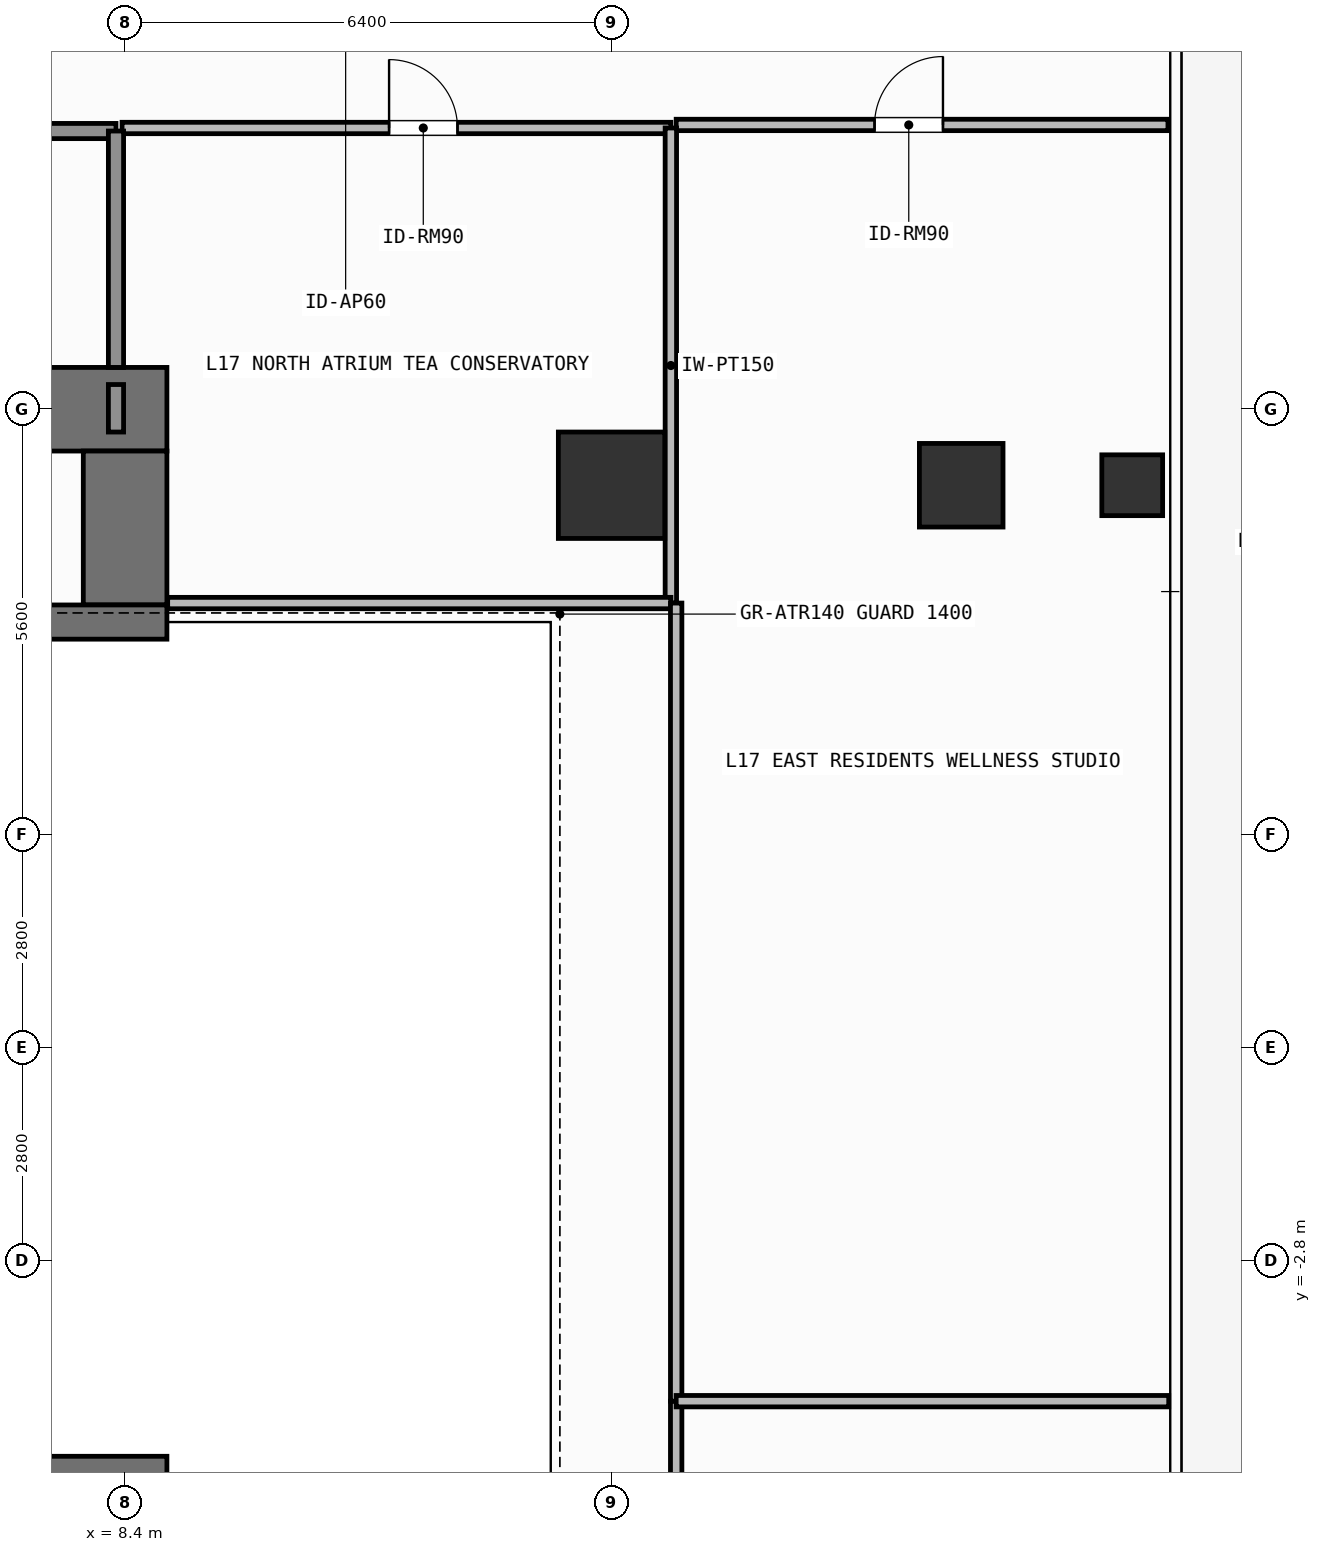
"""IFC4 building model, lengths in metres.
Left out: names, types, materials, properties, quantities, classifications, styles, units other than length and angle.
Written with IfcOpenShell. Run it as: python <this file> out.ifc"""

import sys

from ifc_helpers import new_model, si_unit, direction, frame, frame_2d, origin, origin_2d, place, context, subcontext, project, spatial, rectangle, hollow_rectangle, extrude, element, fill, save


model = new_model("IFC4")
c1 = context("Model", 3, precision=1e-05, world=origin(), true_north=direction((0.0, 1.0)))
c2 = subcontext(c1, "Body", "Model", "MODEL_VIEW")
j1 = project(units=[si_unit("LENGTHUNIT", "METRE"), si_unit("PLANEANGLEUNIT", "RADIAN")], contexts=[c1])
p1 = place(None, origin())
s1 = spatial("IfcSite", under=j1, at=p1, CompositionType="ELEMENT")
p2 = place(p1, origin())
s2 = spatial("IfcBuilding", under=s1, at=p2, CompositionType="ELEMENT")
p3 = place(p2, frame((0.0, 0.0, 65.7)))
s3 = spatial("IfcBuildingStorey", under=s2, at=p3, CompositionType="ELEMENT", Elevation=65.7)
p4 = place(p3, frame((-7.55, 8.4, 0.0), z_axis=(0.0, 0.0, 1.0), x_axis=(1.0, 0.0, 0.0)))
e1 = element("IfcWall", 1, at=p4, inside=s3, PredefinedType="SHEAR", context=c2, shape_type="SweptSolid", body=[
    extrude(rectangle(XDim=16.5, YDim=1.1, at=frame_2d((8.25, 0.0))), origin(), (0.0, 0.0, 1.0), 3.9),
])
p5 = place(p3, frame((8.4, 5.825, 0.0), z_axis=(0.0, 0.0, 1.0), x_axis=(0.0, 1.0, 0.0)))
e2 = element("IfcWall", 2, at=p5, inside=s3, PredefinedType="SHEAR", context=c2, shape_type="SweptSolid", body=[
    extrude(rectangle(XDim=2.025, YDim=1.1, at=frame_2d((1.013, 0.0))), origin(), (0.0, 0.0, 1.0), 3.9),
])
for number, where, z_axis, x_axis in (
    (3, (3.045, -5.6, 0.0), (0.0, 0.0, 1.0), (1.0, 0.0, 0.0)),
    (4, (3.045, 5.6, 0.0), (0.0, 0.0, 1.0), (1.0, 0.0, 0.0)),
):
    element("IfcWall", number, at=place(p3, frame(where, z_axis=z_axis, x_axis=x_axis)), inside=s3, PredefinedType="SHEAR", context=c2, shape_type="SweptSolid", body=[
        extrude(rectangle(XDim=5.905, YDim=0.45, at=frame_2d((2.953, 0.0))), origin(), (0.0, 0.0, 1.0), 3.9),
    ])
p6 = place(p3, frame((14.8, 7.4, 0.0), z_axis=(0.0, 0.0, 1.0), x_axis=(1.0, 0.0, 0.0)))
e5 = element("IfcColumn", 5, at=p6, inside=s3, PredefinedType="COLUMN", context=c2, shape_type="SweptSolid", body=[
    extrude(rectangle(XDim=1.4, YDim=1.4, at=origin_2d()), origin(), (0.0, 0.0, 1.0), 3.9),
])
p7 = place(p3, frame((19.4, 7.4, 0.0), z_axis=(0.0, 0.0, 1.0), x_axis=(1.0, 0.0, 0.0)))
e6 = element("IfcColumn", 6, at=p7, inside=s3, PredefinedType="COLUMN", context=c2, shape_type="SweptSolid", body=[
    extrude(rectangle(XDim=1.1, YDim=1.1, at=origin_2d()), origin(), (0.0, 0.0, 1.0), 3.9),
])
p8 = place(p3, frame((21.65, 7.4, 0.0), z_axis=(0.0, 0.0, 1.0), x_axis=(1.0, 0.0, 0.0)))
e7 = element("IfcColumn", 7, at=p8, inside=s3, PredefinedType="COLUMN", context=c2, shape_type="SweptSolid", body=[
    extrude(hollow_rectangle(XDim=0.8, YDim=0.8, WallThickness=0.036, at=origin_2d()), origin(), (0.0, 0.0, 1.0), 3.9),
])
p9 = place(p3, frame((4.58, 12.06, 0.0), z_axis=(0.0, 0.0, 1.0), x_axis=(1.0, 0.0, 0.0)))
e8 = element("IfcWall", 8, at=p9, inside=s3, PredefinedType="SOLIDWALL", context=c2, shape_type="SweptSolid", body=[
    extrude(rectangle(XDim=3.7, YDim=0.2, at=frame_2d((1.85, 0.0))), origin(), (0.0, 0.0, 1.0), 3.68),
])
p10 = place(p9, frame((1.212, 0.0, 0.0)))
e9 = element("IfcOpeningElement", 9, at=p10, cuts=e8, PredefinedType="OPENING", context=c2, shape_type="SweptSolid", body=[
    extrude(rectangle(XDim=1.1, YDim=2.15, at=frame_2d((0.55, 1.075))), frame((0.0, 0.11, 0.0), z_axis=(0.0, -1.0, 0.0), x_axis=(1.0, 0.0, 0.0)), (0.0, 0.0, 1.0), 0.22),
])
p11 = place(p3, frame((8.36, 12.1, 0.0), z_axis=(0.0, 0.0, 1.0), x_axis=(1.0, 0.0, 0.0)))
e10 = element("IfcWall", 10, at=p11, inside=s3, PredefinedType="PARTITIONING", context=c2, shape_type="SweptSolid", body=[
    extrude(rectangle(XDim=7.22, YDim=0.15, at=frame_2d((3.61, 0.0))), origin(), (0.0, 0.0, 1.0), 3.68),
])
p12 = place(p11, frame((3.513, 0.0, 0.0)))
e11 = element("IfcOpeningElement", 11, at=p12, cuts=e10, PredefinedType="OPENING", context=c2, shape_type="SweptSolid", body=[
    extrude(rectangle(XDim=0.9, YDim=2.1, at=frame_2d((0.45, 1.05))), frame((0.0, 0.085, 0.0), z_axis=(0.0, -1.0, 0.0), x_axis=(1.0, 0.0, 0.0)), (0.0, 0.0, 1.0), 0.17),
])
p13 = place(p3, frame((15.65, 12.14, 0.0), z_axis=(0.0, 0.0, 1.0), x_axis=(1.0, 0.0, 0.0)))
e12 = element("IfcWall", 12, at=p13, inside=s3, PredefinedType="PARTITIONING", context=c2, shape_type="SweptSolid", body=[
    extrude(rectangle(XDim=6.47, YDim=0.15, at=frame_2d((3.235, 0.0))), origin(), (0.0, 0.0, 1.0), 3.68),
])
p14 = place(p13, frame((2.61, 0.0, 0.0)))
e13 = element("IfcOpeningElement", 13, at=p14, cuts=e12, PredefinedType="OPENING", context=c2, shape_type="SweptSolid", body=[
    extrude(rectangle(XDim=0.9, YDim=2.1, at=frame_2d((0.45, 1.05))), frame((0.0, 0.085, 0.0), z_axis=(0.0, -1.0, 0.0), x_axis=(1.0, 0.0, 0.0)), (0.0, 0.0, 1.0), 0.17),
])
p15 = place(p3, frame((8.28, 8.95, 0.0), z_axis=(0.0, 0.0, 1.0), x_axis=(0.0, 1.0, 0.0)))
e14 = element("IfcWall", 14, at=p15, inside=s3, PredefinedType="SOLIDWALL", context=c2, shape_type="SweptSolid", body=[
    extrude(rectangle(XDim=3.11, YDim=0.2, at=frame_2d((1.555, 0.0))), origin(), (0.0, 0.0, 1.0), 3.68),
])
p16 = place(p3, frame((8.28, 8.1, 0.0), z_axis=(0.0, 0.0, 1.0), x_axis=(0.0, 1.0, 0.0)))
e15 = element("IfcWall", 15, at=p16, inside=s3, PredefinedType="SOLIDWALL", context=c2, shape_type="SweptSolid", body=[
    extrude(rectangle(XDim=0.625, YDim=0.2, at=frame_2d((0.312, 0.0))), origin(), (0.0, 0.0, 1.0), 3.68),
])
p17 = place(p3, frame((15.58, 5.85, 0.0), z_axis=(0.0, 0.0, 1.0), x_axis=(0.0, 1.0, 0.0)))
e16 = element("IfcWall", 16, at=p17, inside=s3, PredefinedType="PARTITIONING", context=c2, shape_type="SweptSolid", body=[
    extrude(rectangle(XDim=6.25, YDim=0.15, at=frame_2d((3.125, 0.0))), origin(), (0.0, 0.0, 1.0), 3.68),
])
p18 = place(p3, frame((8.96, 5.85, 0.0), z_axis=(0.0, 0.0, 1.0), x_axis=(1.0, 0.0, 0.0)))
e17 = element("IfcWall", 17, at=p18, inside=s3, PredefinedType="PARTITIONING", context=c2, shape_type="SweptSolid", body=[
    extrude(rectangle(XDim=6.62, YDim=0.15, at=frame_2d((3.31, 0.0))), origin(), (0.0, 0.0, 1.0), 3.68),
])
p19 = place(p3, frame((15.65, -5.85, 0.0), z_axis=(0.0, 0.0, 1.0), x_axis=(0.0, 1.0, 0.0)))
e18 = element("IfcWall", 18, at=p19, inside=s3, PredefinedType="PARTITIONING", context=c2, shape_type="SweptSolid", body=[
    extrude(rectangle(XDim=1.2, YDim=0.15, at=frame_2d((0.6, 0.0))), origin(), (0.0, 0.0, 1.0), 3.68),
])
p20 = place(p3, frame((15.65, -4.65, 0.0), z_axis=(0.0, 0.0, 1.0), x_axis=(0.0, 1.0, 0.0)))
e19 = element("IfcWall", 19, at=p20, inside=s3, PredefinedType="PARTITIONING", context=c2, shape_type="SweptSolid", body=[
    extrude(rectangle(XDim=10.5, YDim=0.15, at=frame_2d((5.25, 0.0))), origin(), (0.0, 0.0, 1.0), 3.68),
])
p21 = place(p3, frame((15.65, -4.65, 0.0), z_axis=(0.0, 0.0, 1.0), x_axis=(1.0, 0.0, 0.0)))
e20 = element("IfcWall", 20, at=p21, inside=s3, PredefinedType="PARTITIONING", context=c2, shape_type="SweptSolid", body=[
    extrude(rectangle(XDim=6.48, YDim=0.15, at=frame_2d((3.24, 0.0))), origin(), (0.0, 0.0, 1.0), 3.68),
])
p22 = place(p12, origin())
e21 = element("IfcDoor", 21, at=p22, inside=s3, OperationType="SINGLE_SWING_LEFT", PredefinedType="DOOR", context=c2, shape_type="SweptSolid", body=[
    extrude(rectangle(XDim=0.9, YDim=2.1, at=frame_2d((0.45, 1.05))), frame((0.0, 0.025, 0.0), z_axis=(0.0, -1.0, 0.0), x_axis=(1.0, 0.0, 0.0)), (0.0, 0.0, 1.0), 0.05),
])
fill(e11, e21)
p23 = place(p14, origin())
e22 = element("IfcDoor", 22, at=p23, inside=s3, OperationType="SINGLE_SWING_RIGHT", PredefinedType="DOOR", context=c2, shape_type="SweptSolid", body=[
    extrude(rectangle(XDim=0.9, YDim=2.1, at=frame_2d((0.45, 1.05))), frame((0.0, 0.025, 0.0), z_axis=(0.0, -1.0, 0.0), x_axis=(1.0, 0.0, 0.0)), (0.0, 0.0, 1.0), 0.05),
])
fill(e13, e22)
save(model, sys.argv[1])
